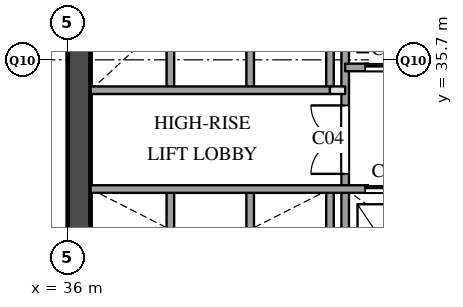
"""IFC4 building model, lengths in metres.
Left out: names, types, materials, properties, quantities, classifications, styles, units other than length and angle.
Written with IfcOpenShell. Run it as: python <this file> out.ifc"""

import sys

from ifc_helpers import new_model, si_unit, direction, frame, frame_2d, origin, place, context, subcontext, project, spatial, rectangle, extrude, element, fill, save


model = new_model("IFC4")
c1 = context("Model", 3, precision=1e-05, world=origin(), true_north=direction((0.0, 1.0)))
c2 = subcontext(c1, "Body", "Model", "MODEL_VIEW")
j1 = project(units=[si_unit("LENGTHUNIT", "METRE"), si_unit("PLANEANGLEUNIT", "RADIAN")], contexts=[c1])
p1 = place(None, origin())
s1 = spatial("IfcSite", under=j1, at=p1, CompositionType="ELEMENT")
p2 = place(p1, origin())
s2 = spatial("IfcBuilding", under=s1, at=p2, CompositionType="ELEMENT")
p3 = place(p2, frame((0.0, 0.0, 8.0)))
s3 = spatial("IfcBuildingStorey", under=s2, at=p3, CompositionType="ELEMENT", Elevation=8.0)
p4 = place(p3, frame((36.3, 29.1, 0.0), z_axis=(0.0, 0.0, 1.0), x_axis=(0.0, 1.0, 0.0)))
e1 = element("IfcWall", 1, at=p4, inside=s3, PredefinedType="SHEAR", context=c2, shape_type="SweptSolid", body=[
    extrude(rectangle(XDim=20.3, YDim=0.6, at=frame_2d((10.15, 0.0))), origin(), (0.0, 0.0, 1.0), 5.59),
])
p5 = place(p3, frame((38.7, 29.1, 0.0), z_axis=(0.0, 0.0, 1.0), x_axis=(0.0, 1.0, 0.0)))
e2 = element("IfcWall", 2, at=p5, inside=s3, PredefinedType="SOLIDWALL", context=c2, shape_type="SweptSolid", body=[
    extrude(rectangle(XDim=3.2, YDim=0.2, at=frame_2d((1.6, 0.0))), origin(), (0.0, 0.0, 1.0), 5.59),
])
p6 = place(p3, frame((38.7, 34.9, 0.0), z_axis=(0.0, 0.0, 1.0), x_axis=(0.0, 1.0, 0.0)))
e3 = element("IfcWall", 3, at=p6, inside=s3, PredefinedType="SOLIDWALL", context=c2, shape_type="SweptSolid", body=[
    extrude(rectangle(XDim=3.2, YDim=0.2, at=frame_2d((1.6, 0.0))), origin(), (0.0, 0.0, 1.0), 5.59),
])
p7 = place(p3, frame((40.8, 29.1, 0.0), z_axis=(0.0, 0.0, 1.0), x_axis=(0.0, 1.0, 0.0)))
e4 = element("IfcWall", 4, at=p7, inside=s3, PredefinedType="SOLIDWALL", context=c2, shape_type="SweptSolid", body=[
    extrude(rectangle(XDim=3.2, YDim=0.2, at=frame_2d((1.6, 0.0))), origin(), (0.0, 0.0, 1.0), 5.59),
])
p8 = place(p3, frame((40.8, 34.9, 0.0), z_axis=(0.0, 0.0, 1.0), x_axis=(0.0, 1.0, 0.0)))
e5 = element("IfcWall", 5, at=p8, inside=s3, PredefinedType="SOLIDWALL", context=c2, shape_type="SweptSolid", body=[
    extrude(rectangle(XDim=3.2, YDim=0.2, at=frame_2d((1.6, 0.0))), origin(), (0.0, 0.0, 1.0), 5.59),
])
p9 = place(p3, frame((42.9, 29.1, 0.0), z_axis=(0.0, 0.0, 1.0), x_axis=(0.0, 1.0, 0.0)))
e6 = element("IfcWall", 6, at=p9, inside=s3, PredefinedType="SOLIDWALL", context=c2, shape_type="SweptSolid", body=[
    extrude(rectangle(XDim=3.2, YDim=0.2, at=frame_2d((1.6, 0.0))), origin(), (0.0, 0.0, 1.0), 5.59),
])
p10 = place(p3, frame((42.9, 34.9, 0.0), z_axis=(0.0, 0.0, 1.0), x_axis=(0.0, 1.0, 0.0)))
e7 = element("IfcWall", 7, at=p10, inside=s3, PredefinedType="SOLIDWALL", context=c2, shape_type="SweptSolid", body=[
    extrude(rectangle(XDim=3.2, YDim=0.2, at=frame_2d((1.6, 0.0))), origin(), (0.0, 0.0, 1.0), 5.59),
])
p11 = place(p3, frame((43.3, 29.1, 0.0), z_axis=(0.0, 0.0, 1.0), x_axis=(0.0, 1.0, 0.0)))
e8 = element("IfcWall", 8, at=p11, inside=s3, PredefinedType="SOLIDWALL", context=c2, shape_type="SweptSolid", body=[
    extrude(rectangle(XDim=9.9, YDim=0.2, at=frame_2d((4.95, 0.0))), origin(), (0.0, 0.0, 1.0), 5.59),
])
p12 = place(p11, frame((3.6, 0.0, 0.0)))
e9 = element("IfcOpeningElement", 9, at=p12, cuts=e8, PredefinedType="OPENING", context=c2, shape_type="SweptSolid", body=[
    extrude(rectangle(XDim=1.8, YDim=2.1, at=frame_2d((0.9, 1.05))), frame((0.0, 0.11, 0.0), z_axis=(0.0, -1.0, 0.0), x_axis=(1.0, 0.0, 0.0)), (0.0, 0.0, 1.0), 0.22),
])
p13 = place(p3, frame((36.6, 32.3, 0.0), z_axis=(0.0, 0.0, 1.0), x_axis=(1.0, 0.0, 0.0)))
e10 = element("IfcWall", 10, at=p13, inside=s3, PredefinedType="SOLIDWALL", context=c2, shape_type="SweptSolid", body=[
    extrude(rectangle(XDim=11.2, YDim=0.2, at=frame_2d((5.6, 0.0))), origin(), (0.0, 0.0, 1.0), 5.59),
])
p14 = place(p13, frame((7.225, 0.0, 0.0)))
e11 = element("IfcOpeningElement", 11, at=p14, cuts=e10, PredefinedType="OPENING", context=c2, shape_type="SweptSolid", body=[
    extrude(rectangle(XDim=1.2, YDim=2.1, at=frame_2d((0.6, 1.05))), frame((0.0, 0.11, 0.0), z_axis=(0.0, -1.0, 0.0), x_axis=(1.0, 0.0, 0.0)), (0.0, 0.0, 1.0), 0.22),
])
p15 = place(p13, frame((9.475, 0.0, 0.0)))
e12 = element("IfcOpeningElement", 12, at=p15, cuts=e10, PredefinedType="OPENING", context=c2, shape_type="SweptSolid", body=[
    extrude(rectangle(XDim=1.2, YDim=2.1, at=frame_2d((0.6, 1.05))), frame((0.0, 0.11, 0.0), z_axis=(0.0, -1.0, 0.0), x_axis=(1.0, 0.0, 0.0)), (0.0, 0.0, 1.0), 0.22),
])
p16 = place(p3, frame((42.9, 34.9, 0.0), z_axis=(0.0, 0.0, 1.0), x_axis=(1.0, 0.0, 0.0)))
e13 = element("IfcWall", 13, at=p16, inside=s3, PredefinedType="PARTITIONING", context=c2, shape_type="SweptSolid", body=[
    extrude(rectangle(XDim=0.4, YDim=0.2, at=frame_2d((0.2, 0.0))), origin(), (0.0, 0.0, 1.0), 5.59),
])
p17 = place(p3, frame((36.6, 34.9, 0.0), z_axis=(0.0, 0.0, 1.0), x_axis=(1.0, 0.0, 0.0)))
e14 = element("IfcWall", 14, at=p17, inside=s3, PredefinedType="SOLIDWALL", context=c2, shape_type="SweptSolid", body=[
    extrude(rectangle(XDim=6.3, YDim=0.2, at=frame_2d((3.15, 0.0))), origin(), (0.0, 0.0, 1.0), 5.59),
])
p18 = place(p3, frame((43.3, 35.5, 0.0), z_axis=(0.0, 0.0, 1.0), x_axis=(1.0, 0.0, 0.0)))
e15 = element("IfcWall", 15, at=p18, inside=s3, PredefinedType="SOLIDWALL", context=c2, shape_type="SweptSolid", body=[
    extrude(rectangle(XDim=4.5, YDim=0.2, at=frame_2d((2.25, 0.0))), origin(), (0.0, 0.0, 1.0), 5.59),
])
p19 = place(p18, frame((0.525, 0.0, 0.0)))
e16 = element("IfcOpeningElement", 16, at=p19, cuts=e15, PredefinedType="OPENING", context=c2, shape_type="SweptSolid", body=[
    extrude(rectangle(XDim=1.2, YDim=2.1, at=frame_2d((0.6, 1.05))), frame((0.0, 0.11, 0.0), z_axis=(0.0, -1.0, 0.0), x_axis=(1.0, 0.0, 0.0)), (0.0, 0.0, 1.0), 0.22),
])
p20 = place(p18, frame((3.025, 0.0, 0.0)))
e17 = element("IfcOpeningElement", 17, at=p20, cuts=e15, PredefinedType="OPENING", context=c2, shape_type="SweptSolid", body=[
    extrude(rectangle(XDim=0.7, YDim=2.1, at=frame_2d((0.35, 1.05))), frame((0.0, 0.11, 0.0), z_axis=(0.0, -1.0, 0.0), x_axis=(1.0, 0.0, 0.0)), (0.0, 0.0, 1.0), 0.22),
])
p21 = place(p14, origin())
e18 = element("IfcDoor", 18, at=p21, inside=s3, OperationType="SLIDING_TO_LEFT", PredefinedType="DOOR", context=c2, shape_type="SweptSolid", body=[
    extrude(rectangle(XDim=1.2, YDim=2.1, at=frame_2d((0.6, 1.05))), frame((0.0, 0.025, 0.0), z_axis=(0.0, -1.0, 0.0), x_axis=(1.0, 0.0, 0.0)), (0.0, 0.0, 1.0), 0.05),
])
fill(e11, e18)
p22 = place(p19, origin())
e19 = element("IfcDoor", 19, at=p22, inside=s3, OperationType="SLIDING_TO_LEFT", PredefinedType="DOOR", context=c2, shape_type="SweptSolid", body=[
    extrude(rectangle(XDim=1.2, YDim=2.1, at=frame_2d((0.6, 1.05))), frame((0.0, 0.025, 0.0), z_axis=(0.0, -1.0, 0.0), x_axis=(1.0, 0.0, 0.0)), (0.0, 0.0, 1.0), 0.05),
])
fill(e16, e19)
p23 = place(p12, origin())
e20 = element("IfcDoor", 20, at=p23, inside=s3, OperationType="DOUBLE_DOOR_SINGLE_SWING", PredefinedType="DOOR", context=c2, shape_type="SweptSolid", body=[
    extrude(rectangle(XDim=1.8, YDim=2.1, at=frame_2d((0.9, 1.05))), frame((0.0, 0.025, 0.0), z_axis=(0.0, -1.0, 0.0), x_axis=(1.0, 0.0, 0.0)), (0.0, 0.0, 1.0), 0.05),
])
fill(e9, e20)
save(model, sys.argv[1])
